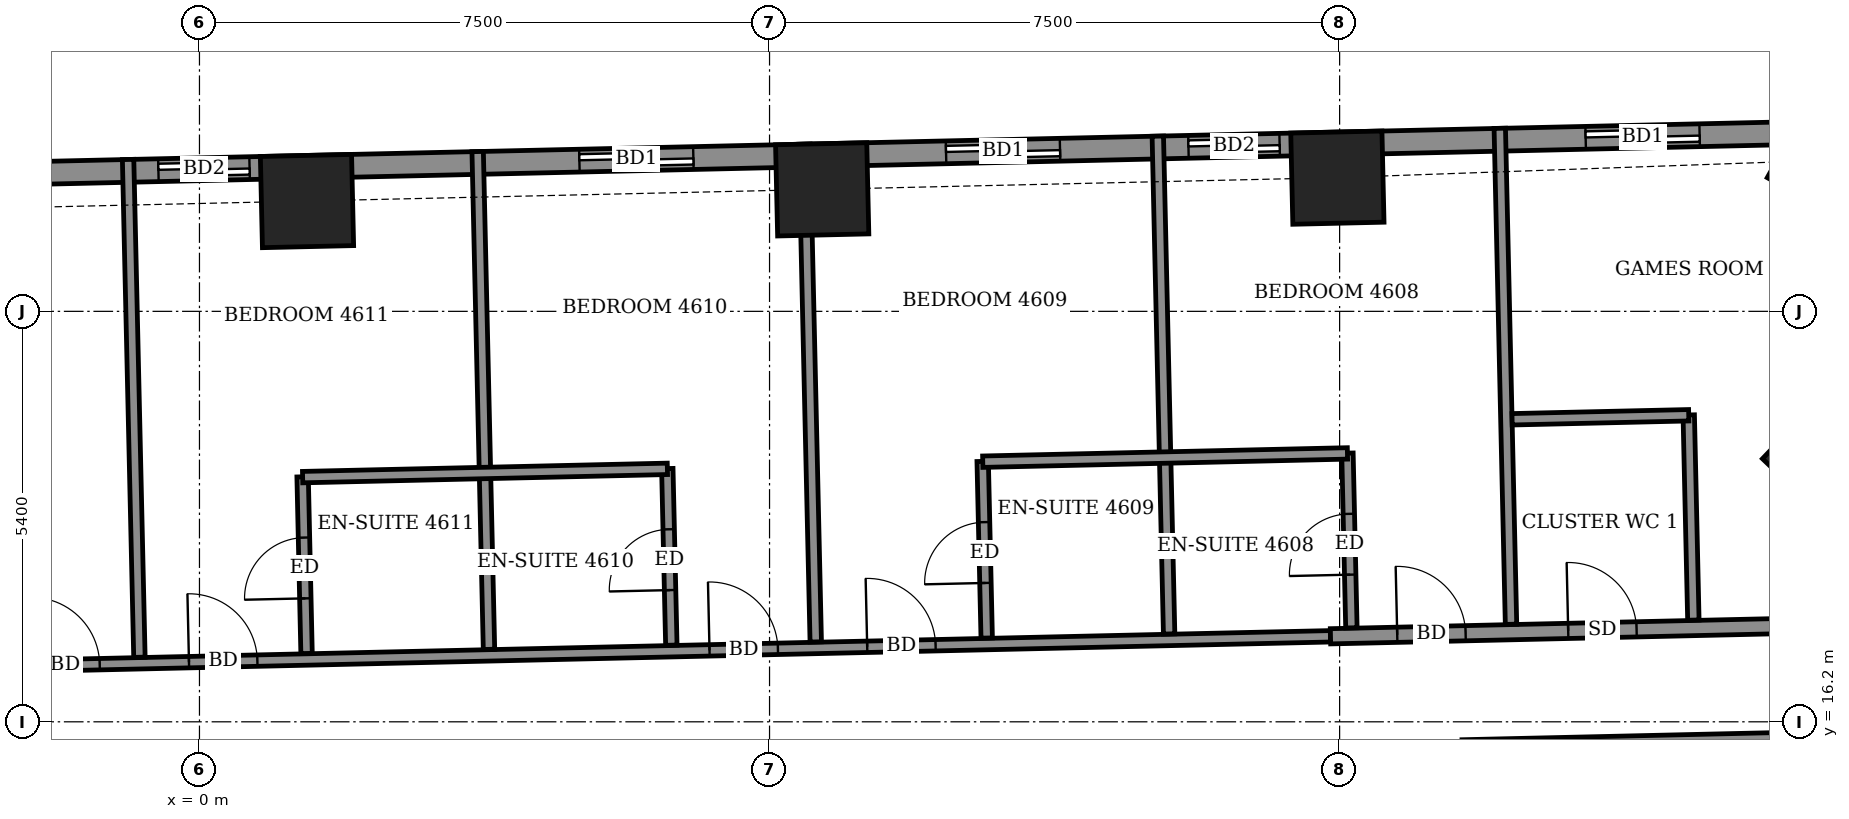
"""IFC4 building model, lengths in metres.
Left out: names, types, materials, properties, quantities, classifications, styles, units other than length and angle.
Written with IfcOpenShell. Run it as: python <this file> out.ifc"""

import sys

from ifc_helpers import new_model, si_unit, direction, frame, frame_2d, origin, origin_2d, place, context, subcontext, project, spatial, rectangle, extrude, element, fill, save


model = new_model("IFC4")
c1 = context("Model", 3, precision=1e-05, world=origin(), true_north=direction((0.0, 1.0)))
c2 = subcontext(c1, "Body", "Model", "MODEL_VIEW")
j1 = project(units=[si_unit("LENGTHUNIT", "METRE"), si_unit("PLANEANGLEUNIT", "RADIAN")], contexts=[c1])
p1 = place(None, origin())
s1 = spatial("IfcSite", under=j1, at=p1, CompositionType="ELEMENT")
p2 = place(p1, origin())
s2 = spatial("IfcBuilding", under=s1, at=p2, CompositionType="ELEMENT")
p3 = place(p2, frame((0.0, 0.0, 182.5)))
s3 = spatial("IfcBuildingStorey", under=s2, at=p3, CompositionType="ELEMENT", Elevation=182.5)
for number, where, z_axis, x_axis in (
    (1, (21.411, 19.68, -0.55), (0.0, 0.0, 1.0), (-0.723, 0.691, 0.0)),
    (2, (21.443, 23.589, -0.55), (0.0, 0.0, 1.0), (-0.873, 0.488, 0.0)),
    (3, (14.971, 23.359, -0.55), (0.0, 0.0, 1.0), (-1.0, -0.023, 0.0)),
    (4, (8.193, 23.205, -0.55), (0.0, 0.0, 1.0), (-1.0, -0.023, 0.0)),
    (5, (1.415, 23.051, -0.55), (0.0, 0.0, 1.0), (-1.0, -0.023, 0.0)),
):
    element("IfcColumn", number, at=place(p3, frame(where, z_axis=z_axis, x_axis=x_axis)), inside=s3, PredefinedType="COLUMN", context=c2, shape_type="SweptSolid", body=[
        extrude(rectangle(XDim=1.2, YDim=1.2, at=origin_2d()), origin(), (0.0, 0.0, 1.0), 3.6),
    ])
p4 = place(p3, frame((21.589, 23.959, 0.0), z_axis=(0.0, 0.0, 1.0), x_axis=(-0.999742671382, -0.022684598702, 0.0)))
e6 = element("IfcWall", 6, at=p4, inside=s3, PredefinedType="SOLIDWALL", context=c2, shape_type="SweptSolid", body=[
    extrude(rectangle(XDim=40.381, YDim=0.3, at=frame_2d((20.19, 0.0))), origin(), (0.0, 0.0, 1.0), 3.05),
])
p5 = place(p4, frame((1.853, 0.0, 0.0)))
e7 = element("IfcOpeningElement", 7, at=p5, cuts=e6, PredefinedType="OPENING", context=c2, shape_type="SweptSolid", body=[
    extrude(rectangle(XDim=1.5, YDim=2.4, at=frame_2d((0.75, 1.2))), frame((0.0, 0.16, 0.0), z_axis=(0.0, -1.0, 0.0), x_axis=(1.0, 0.0, 0.0)), (0.0, 0.0, 1.0), 0.32),
])
p6 = place(p4, frame((7.38, 0.0, 0.0)))
e8 = element("IfcOpeningElement", 8, at=p6, cuts=e6, PredefinedType="OPENING", context=c2, shape_type="SweptSolid", body=[
    extrude(rectangle(XDim=1.2, YDim=2.4, at=frame_2d((0.6, 1.2))), frame((0.0, 0.16, 0.0), z_axis=(0.0, -1.0, 0.0), x_axis=(1.0, 0.0, 0.0)), (0.0, 0.0, 1.0), 0.32),
])
p7 = place(p4, frame((10.27, 0.0, 0.0)))
e9 = element("IfcOpeningElement", 9, at=p7, cuts=e6, PredefinedType="OPENING", context=c2, shape_type="SweptSolid", body=[
    extrude(rectangle(XDim=1.5, YDim=2.4, at=frame_2d((0.75, 1.2))), frame((0.0, 0.16, 0.0), z_axis=(0.0, -1.0, 0.0), x_axis=(1.0, 0.0, 0.0)), (0.0, 0.0, 1.0), 0.32),
])
p8 = place(p4, frame((15.095, 0.0, 0.0)))
e10 = element("IfcOpeningElement", 10, at=p8, cuts=e6, PredefinedType="OPENING", context=c2, shape_type="SweptSolid", body=[
    extrude(rectangle(XDim=1.5, YDim=2.4, at=frame_2d((0.75, 1.2))), frame((0.0, 0.16, 0.0), z_axis=(0.0, -1.0, 0.0), x_axis=(1.0, 0.0, 0.0)), (0.0, 0.0, 1.0), 0.32),
])
p9 = place(p4, frame((20.935, 0.0, 0.0)))
e11 = element("IfcOpeningElement", 11, at=p9, cuts=e6, PredefinedType="OPENING", context=c2, shape_type="SweptSolid", body=[
    extrude(rectangle(XDim=1.2, YDim=2.4, at=frame_2d((0.6, 1.2))), frame((0.0, 0.16, 0.0), z_axis=(0.0, -1.0, 0.0), x_axis=(1.0, 0.0, 0.0)), (0.0, 0.0, 1.0), 0.32),
])
p10 = place(p4, frame((23.825, 0.0, 0.0)))
e12 = element("IfcOpeningElement", 12, at=p10, cuts=e6, PredefinedType="OPENING", context=c2, shape_type="SweptSolid", body=[
    extrude(rectangle(XDim=1.5, YDim=2.4, at=frame_2d((0.75, 1.2))), frame((0.0, 0.16, 0.0), z_axis=(0.0, -1.0, 0.0), x_axis=(1.0, 0.0, 0.0)), (0.0, 0.0, 1.0), 0.32),
])
p11 = place(p4, frame((28.65, 0.0, 0.0)))
e13 = element("IfcOpeningElement", 13, at=p11, cuts=e6, PredefinedType="OPENING", context=c2, shape_type="SweptSolid", body=[
    extrude(rectangle(XDim=1.5, YDim=2.4, at=frame_2d((0.75, 1.2))), frame((0.0, 0.16, 0.0), z_axis=(0.0, -1.0, 0.0), x_axis=(1.0, 0.0, 0.0)), (0.0, 0.0, 1.0), 0.32),
])
p12 = place(p4, frame((31.84, 0.0, 0.0)))
e14 = element("IfcOpeningElement", 14, at=p12, cuts=e6, PredefinedType="OPENING", context=c2, shape_type="SweptSolid", body=[
    extrude(rectangle(XDim=1.2, YDim=2.4, at=frame_2d((0.6, 1.2))), frame((0.0, 0.16, 0.0), z_axis=(0.0, -1.0, 0.0), x_axis=(1.0, 0.0, 0.0)), (0.0, 0.0, 1.0), 0.32),
])
p13 = place(p4, frame((36.57, 0.0, 0.9)))
e15 = element("IfcOpeningElement", 15, at=p13, cuts=e6, PredefinedType="OPENING", context=c2, shape_type="SweptSolid", body=[
    extrude(rectangle(XDim=2.4, YDim=1.5, at=frame_2d((1.2, 0.75))), frame((0.0, 0.16, 0.0), z_axis=(0.0, -1.0, 0.0), x_axis=(1.0, 0.0, 0.0)), (0.0, 0.0, 1.0), 0.32),
])
p14 = place(p3, frame((16.612, 15.864, 0.0), z_axis=(0.0, 0.0, 1.0), x_axis=(0.999741181744, 0.022750154412, 0.0)))
e16 = element("IfcWall", 16, at=p14, inside=s3, PredefinedType="PARTITIONING", context=c2, shape_type="SweptSolid", body=[
    extrude(rectangle(XDim=7.909, YDim=0.2, at=frame_2d((3.955, 0.0))), origin(), (0.0, 0.0, 1.0), 3.05),
])
p15 = place(p3, frame((-15.649, 16.633, 0.0), z_axis=(0.0, 0.0, 1.0), x_axis=(0.999743261737, 0.022658565952, 0.0)))
e17 = element("IfcWall", 17, at=p15, inside=s3, PredefinedType="PARTITIONING", context=c2, shape_type="SweptSolid", body=[
    extrude(rectangle(XDim=30.536, YDim=0.15, at=frame_2d((15.268, 0.0))), origin(), (0.0, 0.0, 1.0), 3.05),
])
p16 = place(p15, frame((24.44, 0.0, 0.0)))
e18 = element("IfcOpeningElement", 18, at=p16, cuts=e17, PredefinedType="OPENING", context=c2, shape_type="SweptSolid", body=[
    extrude(rectangle(XDim=0.9, YDim=2.1, at=frame_2d((0.45, 1.05))), frame((0.0, 0.085, 0.0), z_axis=(0.0, -1.0, 0.0), x_axis=(1.0, 0.0, 0.0)), (0.0, 0.0, 1.0), 0.17),
])
p17 = place(p15, frame((22.365, 0.0, 0.0)))
e19 = element("IfcOpeningElement", 19, at=p17, cuts=e17, PredefinedType="OPENING", context=c2, shape_type="SweptSolid", body=[
    extrude(rectangle(XDim=0.9, YDim=2.1, at=frame_2d((0.45, 1.05))), frame((0.0, 0.085, 0.0), z_axis=(0.0, -1.0, 0.0), x_axis=(1.0, 0.0, 0.0)), (0.0, 0.0, 1.0), 0.17),
])
p18 = place(p15, frame((15.515, 0.0, 0.0)))
e20 = element("IfcOpeningElement", 20, at=p18, cuts=e17, PredefinedType="OPENING", context=c2, shape_type="SweptSolid", body=[
    extrude(rectangle(XDim=0.9, YDim=2.1, at=frame_2d((0.45, 1.05))), frame((0.0, 0.085, 0.0), z_axis=(0.0, -1.0, 0.0), x_axis=(1.0, 0.0, 0.0)), (0.0, 0.0, 1.0), 0.17),
])
p19 = place(p15, frame((13.44, 0.0, 0.0)))
e21 = element("IfcOpeningElement", 21, at=p19, cuts=e17, PredefinedType="OPENING", context=c2, shape_type="SweptSolid", body=[
    extrude(rectangle(XDim=0.9, YDim=2.1, at=frame_2d((0.45, 1.05))), frame((0.0, 0.085, 0.0), z_axis=(0.0, -1.0, 0.0), x_axis=(1.0, 0.0, 0.0)), (0.0, 0.0, 1.0), 0.17),
])
p20 = place(p15, frame((6.565, 0.0, 0.0)))
e22 = element("IfcOpeningElement", 22, at=p20, cuts=e17, PredefinedType="OPENING", context=c2, shape_type="SweptSolid", body=[
    extrude(rectangle(XDim=0.9, YDim=2.1, at=frame_2d((0.45, 1.05))), frame((0.0, 0.085, 0.0), z_axis=(0.0, -1.0, 0.0), x_axis=(1.0, 0.0, 0.0)), (0.0, 0.0, 1.0), 0.17),
])
p21 = place(p15, frame((4.415, 0.0, 0.0)))
e23 = element("IfcOpeningElement", 23, at=p21, cuts=e17, PredefinedType="OPENING", context=c2, shape_type="SweptSolid", body=[
    extrude(rectangle(XDim=0.9, YDim=2.1, at=frame_2d((0.45, 1.05))), frame((0.0, 0.085, 0.0), z_axis=(0.0, -1.0, 0.0), x_axis=(1.0, 0.0, 0.0)), (0.0, 0.0, 1.0), 0.17),
])
p22 = place(p15, frame((0.2, 0.0, 0.0)))
e24 = element("IfcOpeningElement", 24, at=p22, cuts=e17, PredefinedType="OPENING", context=c2, shape_type="SweptSolid", body=[
    extrude(rectangle(XDim=0.9, YDim=2.1, at=frame_2d((0.45, 1.05))), frame((0.0, 0.085, 0.0), z_axis=(0.0, -1.0, 0.0), x_axis=(1.0, 0.0, 0.0)), (0.0, 0.0, 1.0), 0.17),
])
p23 = place(p3, frame((14.88, 17.325, 0.0), z_axis=(0.0, 0.0, 1.0), x_axis=(0.999742504166, 0.022691966963, 0.0)))
e25 = element("IfcWall", 25, at=p23, inside=s3, PredefinedType="PARTITIONING", context=c2, shape_type="SweptSolid", body=[
    extrude(rectangle(XDim=9.608, YDim=0.2, at=frame_2d((4.804, 0.0))), origin(), (0.0, 0.0, 1.0), 3.05),
])
p24 = place(p23, frame((7.393, 0.0, 0.0)))
e26 = element("IfcOpeningElement", 26, at=p24, cuts=e25, PredefinedType="OPENING", context=c2, shape_type="SweptSolid", body=[
    extrude(rectangle(XDim=1.0, YDim=2.1, at=frame_2d((0.5, 1.05))), frame((0.0, 0.11, 0.0), z_axis=(0.0, -1.0, 0.0), x_axis=(1.0, 0.0, 0.0)), (0.0, 0.0, 1.0), 0.22),
])
p25 = place(p23, frame((3.128, 0.0, 0.0)))
e27 = element("IfcOpeningElement", 27, at=p25, cuts=e25, PredefinedType="OPENING", context=c2, shape_type="SweptSolid", body=[
    extrude(rectangle(XDim=0.9, YDim=2.1, at=frame_2d((0.45, 1.05))), frame((0.0, 0.11, 0.0), z_axis=(0.0, -1.0, 0.0), x_axis=(1.0, 0.0, 0.0)), (0.0, 0.0, 1.0), 0.22),
])
p26 = place(p23, frame((0.878, 0.0, 0.0)))
e28 = element("IfcOpeningElement", 28, at=p26, cuts=e25, PredefinedType="OPENING", context=c2, shape_type="SweptSolid", body=[
    extrude(rectangle(XDim=0.9, YDim=2.1, at=frame_2d((0.45, 1.05))), frame((0.0, 0.11, 0.0), z_axis=(0.0, -1.0, 0.0), x_axis=(1.0, 0.0, 0.0)), (0.0, 0.0, 1.0), 0.22),
])
p27 = place(p3, frame((-0.79, 17.049, 0.0), z_axis=(0.0, 0.0, 1.0), x_axis=(-0.022734951231, 0.999741527592, 0.0)))
e29 = element("IfcWall", 29, at=p27, inside=s3, PredefinedType="PARTITIONING", context=c2, shape_type="SweptSolid", body=[
    extrude(rectangle(XDim=6.551, YDim=0.15, at=frame_2d((3.275, 0.0))), origin(), (0.0, 0.0, 1.0), 2.55),
])
p28 = place(p3, frame((1.409, 17.099, 0.0), z_axis=(0.0, 0.0, 1.0), x_axis=(-0.022370700241, 0.999749744571, 0.0)))
e30 = element("IfcWall", 30, at=p28, inside=s3, PredefinedType="PARTITIONING", context=c2, shape_type="SweptSolid", body=[
    extrude(rectangle(XDim=2.324, YDim=0.15, at=frame_2d((1.162, 0.0))), origin(), (0.0, 0.0, 1.0), 3.05),
])
p29 = place(p28, frame((0.725, 0.0, 0.0)))
e31 = element("IfcOpeningElement", 31, at=p29, cuts=e30, PredefinedType="OPENING", context=c2, shape_type="SweptSolid", body=[
    extrude(rectangle(XDim=0.8, YDim=2.1, at=frame_2d((0.4, 1.05))), frame((0.0, 0.085, 0.0), z_axis=(0.0, -1.0, 0.0), x_axis=(1.0, 0.0, 0.0)), (0.0, 0.0, 1.0), 0.17),
])
p30 = place(p3, frame((3.809, 17.153, 0.0), z_axis=(0.0, 0.0, 1.0), x_axis=(-0.022772202332, 0.999740679777, 0.0)))
e32 = element("IfcWall", 32, at=p30, inside=s3, PredefinedType="PARTITIONING", context=c2, shape_type="SweptSolid", body=[
    extrude(rectangle(XDim=6.551, YDim=0.15, at=frame_2d((3.275, 0.0))), origin(), (0.0, 0.0, 1.0), 2.55),
])
p31 = place(p3, frame((6.208, 17.208, 0.0), z_axis=(0.0, 0.0, 1.0), x_axis=(-0.02279059109, 0.999740260747, 0.0)))
e33 = element("IfcWall", 33, at=p31, inside=s3, PredefinedType="PARTITIONING", context=c2, shape_type="SweptSolid", body=[
    extrude(rectangle(XDim=2.324, YDim=0.15, at=frame_2d((1.162, 0.0))), origin(), (0.0, 0.0, 1.0), 3.05),
])
p32 = place(p31, frame((0.725, 0.0, 0.0)))
e34 = element("IfcOpeningElement", 34, at=p32, cuts=e33, PredefinedType="OPENING", context=c2, shape_type="SweptSolid", body=[
    extrude(rectangle(XDim=0.8, YDim=2.1, at=frame_2d((0.4, 1.05))), frame((0.0, 0.085, 0.0), z_axis=(0.0, -1.0, 0.0), x_axis=(1.0, 0.0, 0.0)), (0.0, 0.0, 1.0), 0.17),
])
p33 = place(p3, frame((8.108, 17.251, 0.0), z_axis=(0.0, 0.0, 1.0), x_axis=(-0.022734104141, 0.999741546855, 0.0)))
e35 = element("IfcWall", 35, at=p33, inside=s3, PredefinedType="PARTITIONING", context=c2, shape_type="SweptSolid", body=[
    extrude(rectangle(XDim=6.551, YDim=0.15, at=frame_2d((3.275, 0.0))), origin(), (0.0, 0.0, 1.0), 3.05),
])
p34 = place(p3, frame((10.357, 17.302, 0.0), z_axis=(0.0, 0.0, 1.0), x_axis=(-0.02279059109, 0.999740260747, 0.0)))
e36 = element("IfcWall", 36, at=p34, inside=s3, PredefinedType="PARTITIONING", context=c2, shape_type="SweptSolid", body=[
    extrude(rectangle(XDim=2.324, YDim=0.15, at=frame_2d((1.162, 0.0))), origin(), (0.0, 0.0, 1.0), 3.05),
])
p35 = place(p34, frame((0.725, 0.0, 0.0)))
e37 = element("IfcOpeningElement", 37, at=p35, cuts=e36, PredefinedType="OPENING", context=c2, shape_type="SweptSolid", body=[
    extrude(rectangle(XDim=0.8, YDim=2.1, at=frame_2d((0.4, 1.05))), frame((0.0, 0.085, 0.0), z_axis=(0.0, -1.0, 0.0), x_axis=(1.0, 0.0, 0.0)), (0.0, 0.0, 1.0), 0.17),
])
p36 = place(p3, frame((12.757, 17.356, 0.0), z_axis=(0.0, 0.0, 1.0), x_axis=(-0.022771353855, 0.999740699103, 0.0)))
e38 = element("IfcWall", 38, at=p36, inside=s3, PredefinedType="PARTITIONING", context=c2, shape_type="SweptSolid", body=[
    extrude(rectangle(XDim=6.551, YDim=0.15, at=frame_2d((3.275, 0.0))), origin(), (0.0, 0.0, 1.0), 2.55),
])
p37 = place(p3, frame((15.155, 17.436, 0.0), z_axis=(0.0, 0.0, 1.0), x_axis=(-0.022612884682, 0.999744296031, 0.0)))
e39 = element("IfcWall", 39, at=p37, inside=s3, PredefinedType="PARTITIONING", context=c2, shape_type="SweptSolid", body=[
    extrude(rectangle(XDim=2.3, YDim=0.15, at=frame_2d((1.15, 0.0))), origin(), (0.0, 0.0, 1.0), 3.05),
])
p38 = place(p37, frame((0.7, 0.0, 0.0)))
e40 = element("IfcOpeningElement", 40, at=p38, cuts=e39, PredefinedType="OPENING", context=c2, shape_type="SweptSolid", body=[
    extrude(rectangle(XDim=0.8, YDim=2.1, at=frame_2d((0.4, 1.05))), frame((0.0, 0.085, 0.0), z_axis=(0.0, -1.0, 0.0), x_axis=(1.0, 0.0, 0.0)), (0.0, 0.0, 1.0), 0.17),
])
p39 = place(p3, frame((17.255, 17.483, 0.0), z_axis=(0.0, 0.0, 1.0), x_axis=(-0.022667874761, 0.999743050715, 0.0)))
e41 = element("IfcWall", 41, at=p39, inside=s3, PredefinedType="PARTITIONING", context=c2, shape_type="SweptSolid", body=[
    extrude(rectangle(XDim=6.527, YDim=0.15, at=frame_2d((3.263, 0.0))), origin(), (0.0, 0.0, 1.0), 2.55),
])
p40 = place(p3, frame((19.654, 17.538, 0.0), z_axis=(0.0, 0.0, 1.0), x_axis=(-0.02260842146, 0.999744396973, 0.0)))
e42 = element("IfcWall", 42, at=p40, inside=s3, PredefinedType="PARTITIONING", context=c2, shape_type="SweptSolid", body=[
    extrude(rectangle(XDim=2.7, YDim=0.15, at=frame_2d((1.35, 0.0))), origin(), (0.0, 0.0, 1.0), 3.05),
])
p41 = place(p3, frame((1.357, 19.419, 0.0), z_axis=(0.0, 0.0, 1.0), x_axis=(0.99974154664, 0.022734113616, 0.0)))
e43 = element("IfcWall", 43, at=p41, inside=s3, PredefinedType="PARTITIONING", context=c2, shape_type="SweptSolid", body=[
    extrude(rectangle(XDim=4.8, YDim=0.15, at=frame_2d((2.4, 0.0))), origin(), (0.0, 0.0, 1.0), 3.05),
])
p42 = place(p3, frame((10.305, 19.622, 0.0), z_axis=(0.0, 0.0, 1.0), x_axis=(0.999742596585, 0.02268789488, 0.0)))
e44 = element("IfcWall", 44, at=p42, inside=s3, PredefinedType="PARTITIONING", context=c2, shape_type="SweptSolid", body=[
    extrude(rectangle(XDim=4.799, YDim=0.15, at=frame_2d((2.4, 0.0))), origin(), (0.0, 0.0, 1.0), 3.05),
])
p43 = place(p3, frame((17.269, 20.18, 0.0), z_axis=(0.0, 0.0, 1.0), x_axis=(0.999740260747, 0.02279059109, 0.0)))
e45 = element("IfcWall", 45, at=p43, inside=s3, PredefinedType="PARTITIONING", context=c2, shape_type="SweptSolid", body=[
    extrude(rectangle(XDim=2.324, YDim=0.15, at=frame_2d((1.162, 0.0))), origin(), (0.0, 0.0, 1.0), 3.05),
])
p44 = place(p5, origin())
e46 = element("IfcDoor", 46, at=p44, inside=s3, OperationType="SLIDING_TO_LEFT", PredefinedType="DOOR", context=c2, shape_type="SweptSolid", body=[
    extrude(rectangle(XDim=1.5, YDim=2.4, at=frame_2d((0.75, 1.2))), frame((0.0, 0.025, 0.0), z_axis=(0.0, -1.0, 0.0), x_axis=(1.0, 0.0, 0.0)), (0.0, 0.0, 1.0), 0.05),
])
fill(e7, e46)
p45 = place(p6, origin())
e47 = element("IfcDoor", 47, at=p45, inside=s3, OperationType="SLIDING_TO_LEFT", PredefinedType="DOOR", context=c2, shape_type="SweptSolid", body=[
    extrude(rectangle(XDim=1.2, YDim=2.4, at=frame_2d((0.6, 1.2))), frame((0.0, 0.025, 0.0), z_axis=(0.0, -1.0, 0.0), x_axis=(1.0, 0.0, 0.0)), (0.0, 0.0, 1.0), 0.05),
])
fill(e8, e47)
p46 = place(p7, origin())
e48 = element("IfcDoor", 48, at=p46, inside=s3, OperationType="SLIDING_TO_LEFT", PredefinedType="DOOR", context=c2, shape_type="SweptSolid", body=[
    extrude(rectangle(XDim=1.5, YDim=2.4, at=frame_2d((0.75, 1.2))), frame((0.0, 0.025, 0.0), z_axis=(0.0, -1.0, 0.0), x_axis=(1.0, 0.0, 0.0)), (0.0, 0.0, 1.0), 0.05),
])
fill(e9, e48)
p47 = place(p8, origin())
e49 = element("IfcDoor", 49, at=p47, inside=s3, OperationType="SLIDING_TO_LEFT", PredefinedType="DOOR", context=c2, shape_type="SweptSolid", body=[
    extrude(rectangle(XDim=1.5, YDim=2.4, at=frame_2d((0.75, 1.2))), frame((0.0, 0.025, 0.0), z_axis=(0.0, -1.0, 0.0), x_axis=(1.0, 0.0, 0.0)), (0.0, 0.0, 1.0), 0.05),
])
fill(e10, e49)
p48 = place(p9, origin())
e50 = element("IfcDoor", 50, at=p48, inside=s3, OperationType="SLIDING_TO_LEFT", PredefinedType="DOOR", context=c2, shape_type="SweptSolid", body=[
    extrude(rectangle(XDim=1.2, YDim=2.4, at=frame_2d((0.6, 1.2))), frame((0.0, 0.025, 0.0), z_axis=(0.0, -1.0, 0.0), x_axis=(1.0, 0.0, 0.0)), (0.0, 0.0, 1.0), 0.05),
])
fill(e11, e50)
p49 = place(p25, origin())
e51 = element("IfcDoor", 51, at=p49, inside=s3, OperationType="SINGLE_SWING_LEFT", PredefinedType="DOOR", context=c2, shape_type="SweptSolid", body=[
    extrude(rectangle(XDim=0.9, YDim=2.1, at=frame_2d((0.45, 1.05))), frame((0.0, 0.025, 0.0), z_axis=(0.0, -1.0, 0.0), x_axis=(1.0, 0.0, 0.0)), (0.0, 0.0, 1.0), 0.05),
])
fill(e27, e51)
p50 = place(p26, origin())
e52 = element("IfcDoor", 52, at=p50, inside=s3, OperationType="SINGLE_SWING_RIGHT", PredefinedType="DOOR", context=c2, shape_type="SweptSolid", body=[
    extrude(rectangle(XDim=0.9, YDim=2.1, at=frame_2d((0.45, 1.05))), frame((0.0, 0.025, 0.0), z_axis=(0.0, -1.0, 0.0), x_axis=(1.0, 0.0, 0.0)), (0.0, 0.0, 1.0), 0.05),
])
fill(e28, e52)
p51 = place(p38, origin())
e53 = element("IfcDoor", 53, at=p51, inside=s3, OperationType="SINGLE_SWING_RIGHT", PredefinedType="DOOR", context=c2, shape_type="SweptSolid", body=[
    extrude(rectangle(XDim=0.8, YDim=2.1, at=frame_2d((0.4, 1.05))), frame((0.0, 0.025, 0.0), z_axis=(0.0, -1.0, 0.0), x_axis=(1.0, 0.0, 0.0)), (0.0, 0.0, 1.0), 0.05),
])
fill(e40, e53)
p52 = place(p16, origin())
e54 = element("IfcDoor", 54, at=p52, inside=s3, OperationType="SINGLE_SWING_LEFT", PredefinedType="DOOR", context=c2, shape_type="SweptSolid", body=[
    extrude(rectangle(XDim=0.9, YDim=2.1, at=frame_2d((0.45, 1.05))), frame((0.0, 0.025, 0.0), z_axis=(0.0, -1.0, 0.0), x_axis=(1.0, 0.0, 0.0)), (0.0, 0.0, 1.0), 0.05),
])
fill(e18, e54)
p53 = place(p35, origin())
e55 = element("IfcDoor", 55, at=p53, inside=s3, OperationType="SINGLE_SWING_LEFT", PredefinedType="DOOR", context=c2, shape_type="SweptSolid", body=[
    extrude(rectangle(XDim=0.8, YDim=2.1, at=frame_2d((0.4, 1.05))), frame((0.0, 0.025, 0.0), z_axis=(0.0, -1.0, 0.0), x_axis=(1.0, 0.0, 0.0)), (0.0, 0.0, 1.0), 0.05),
])
fill(e37, e55)
p54 = place(p17, origin())
e56 = element("IfcDoor", 56, at=p54, inside=s3, OperationType="SINGLE_SWING_RIGHT", PredefinedType="DOOR", context=c2, shape_type="SweptSolid", body=[
    extrude(rectangle(XDim=0.9, YDim=2.1, at=frame_2d((0.45, 1.05))), frame((0.0, 0.025, 0.0), z_axis=(0.0, -1.0, 0.0), x_axis=(1.0, 0.0, 0.0)), (0.0, 0.0, 1.0), 0.05),
])
fill(e19, e56)
p55 = place(p32, origin())
e57 = element("IfcDoor", 57, at=p55, inside=s3, OperationType="SINGLE_SWING_RIGHT", PredefinedType="DOOR", context=c2, shape_type="SweptSolid", body=[
    extrude(rectangle(XDim=0.8, YDim=2.1, at=frame_2d((0.4, 1.05))), frame((0.0, 0.025, 0.0), z_axis=(0.0, -1.0, 0.0), x_axis=(1.0, 0.0, 0.0)), (0.0, 0.0, 1.0), 0.05),
])
fill(e34, e57)
p56 = place(p18, origin())
e58 = element("IfcDoor", 58, at=p56, inside=s3, OperationType="SINGLE_SWING_LEFT", PredefinedType="DOOR", context=c2, shape_type="SweptSolid", body=[
    extrude(rectangle(XDim=0.9, YDim=2.1, at=frame_2d((0.45, 1.05))), frame((0.0, 0.025, 0.0), z_axis=(0.0, -1.0, 0.0), x_axis=(1.0, 0.0, 0.0)), (0.0, 0.0, 1.0), 0.05),
])
fill(e20, e58)
p57 = place(p29, origin())
e59 = element("IfcDoor", 59, at=p57, inside=s3, OperationType="SINGLE_SWING_LEFT", PredefinedType="DOOR", context=c2, shape_type="SweptSolid", body=[
    extrude(rectangle(XDim=0.8, YDim=2.1, at=frame_2d((0.4, 1.05))), frame((0.0, 0.025, 0.0), z_axis=(0.0, -1.0, 0.0), x_axis=(1.0, 0.0, 0.0)), (0.0, 0.0, 1.0), 0.05),
])
fill(e31, e59)
p58 = place(p19, origin())
e60 = element("IfcDoor", 60, at=p58, inside=s3, OperationType="SINGLE_SWING_RIGHT", PredefinedType="DOOR", context=c2, shape_type="SweptSolid", body=[
    extrude(rectangle(XDim=0.9, YDim=2.1, at=frame_2d((0.45, 1.05))), frame((0.0, 0.025, 0.0), z_axis=(0.0, -1.0, 0.0), x_axis=(1.0, 0.0, 0.0)), (0.0, 0.0, 1.0), 0.05),
])
fill(e21, e60)
save(model, sys.argv[1])
